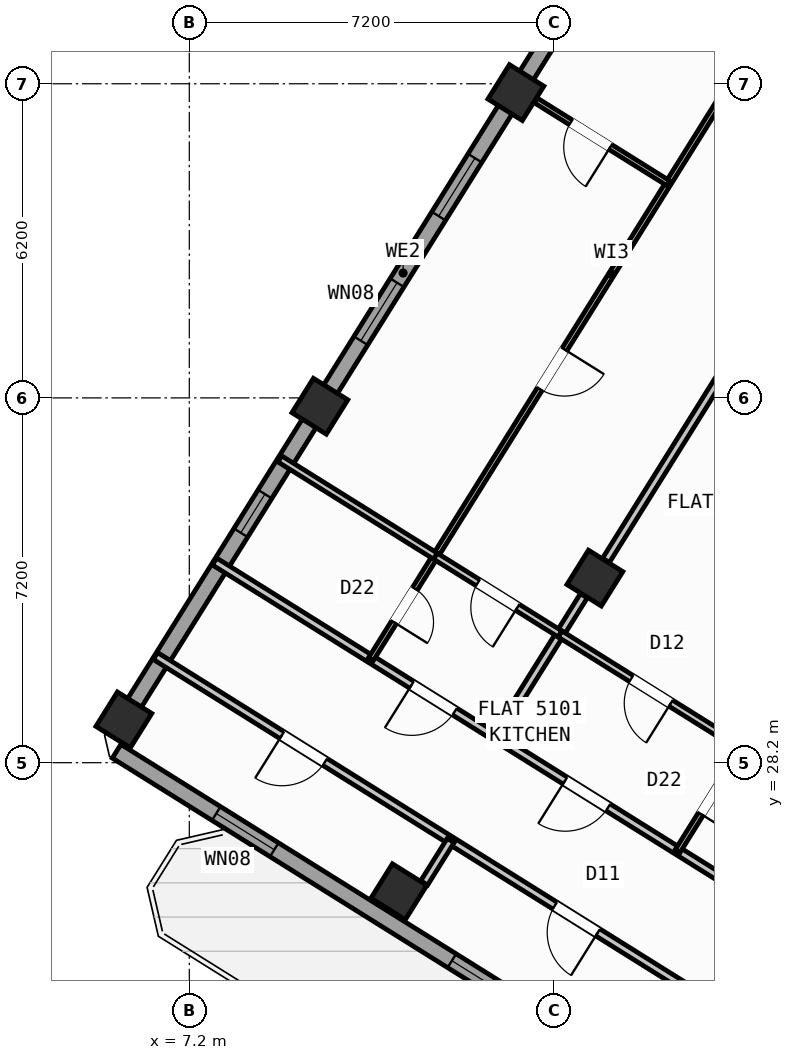
"""IFC4 building model, lengths in metres.
Left out: names, types, materials, properties, quantities, classifications, styles, units other than length and angle.
Written with IfcOpenShell. Run it as: python <this file> out.ifc"""

import sys

from ifc_helpers import new_model, si_unit, direction, frame, frame_2d, origin, origin_2d, place, context, subcontext, project, spatial, rectangle, hollow_rectangle, extrude, source, transform, mapped, element, fill, save


model = new_model("IFC4")
c1 = context("Model", 3, precision=1e-05, world=origin(), true_north=direction((0.0, 1.0)))
c2 = subcontext(c1, "Body", "Model", "MODEL_VIEW")
j1 = project(units=[si_unit("LENGTHUNIT", "METRE"), si_unit("PLANEANGLEUNIT", "RADIAN")], contexts=[c1])
p1 = place(None, origin())
s1 = spatial("IfcSite", under=j1, at=p1, CompositionType="ELEMENT")
p2 = place(p1, origin())
s2 = spatial("IfcBuilding", under=s1, at=p2, CompositionType="ELEMENT")
p3 = place(p2, frame((0.0, 0.0, 204.0)))
s3 = spatial("IfcBuildingStorey", under=s2, at=p3, CompositionType="ELEMENT", Elevation=204.0)
m1 = source(origin(), c2, "Body", "SweptSolid", [
    extrude(hollow_rectangle(XDim=0.8, YDim=0.8, WallThickness=0.032, at=origin_2d()), origin(), (0.0, 0.0, 1.0), 3.6),
])
for number, where, z_axis, x_axis in (
    (1, (15.205, 31.844, 0.0), (0.0, 0.0, 1.0), (-0.848, 0.53, 0.0)),
    (2, (11.336, 25.653, 0.0), (0.0, 0.0, 1.0), (-0.848, 0.53, 0.0)),
    (3, (13.646, 41.426, 0.0), (0.0, 0.0, 1.0), (-0.848, 0.53, 0.0)),
    (4, (9.777, 35.235, 0.0), (0.0, 0.0, 1.0), (-0.848, 0.53, 0.0)),
    (5, (5.909, 29.044, 0.0), (0.0, 0.0, 1.0), (-0.848, 0.53, 0.0)),
):
    element("IfcColumn", number, at=place(p3, frame(where, z_axis=z_axis, x_axis=x_axis)), inside=s3, PredefinedType="COLUMN", context=c2, shape_type="MappedRepresentation", body=[
        mapped(m1, transform((0.0, 0.0, 0.0), scale=1.0)),
    ])
p4 = place(p3, frame((31.76, 12.183, 0.0), z_axis=(0.0, 0.0, 1.0), x_axis=(-0.848047074256, 0.529920899612, 0.0)))
e6 = element("IfcWall", 6, at=p4, inside=s3, PredefinedType="STANDARD", context=c2, shape_type="SweptSolid", body=[
    extrude(rectangle(XDim=30.652, YDim=0.32, at=frame_2d((15.326, 0.0))), origin(), (0.0, 0.0, 1.0), 3.35),
])
p5 = place(p4, frame((15.166, 0.0, 0.0)))
e7 = element("IfcOpeningElement", 7, at=p5, cuts=e6, PredefinedType="OPENING", context=c2, shape_type="SweptSolid", body=[
    extrude(rectangle(XDim=1.2, YDim=2.15, at=frame_2d((0.6, 1.075))), frame((0.0, 0.17, 0.0), z_axis=(0.0, -1.0, 0.0), x_axis=(1.0, 0.0, 0.0)), (0.0, 0.0, 1.0), 0.34),
])
p6 = place(p4, frame((2.24, 0.0, 0.9)))
e8 = element("IfcOpeningElement", 8, at=p6, cuts=e6, PredefinedType="OPENING", context=c2, shape_type="SweptSolid", body=[
    extrude(rectangle(XDim=1.65, YDim=1.45, at=frame_2d((0.825, 0.725))), frame((0.0, 0.17, 0.0), z_axis=(0.0, -1.0, 0.0), x_axis=(1.0, 0.0, 0.0)), (0.0, 0.0, 1.0), 0.34),
])
p7 = place(p4, frame((7.469, 0.0, 0.9)))
e9 = element("IfcOpeningElement", 9, at=p7, cuts=e6, PredefinedType="OPENING", context=c2, shape_type="SweptSolid", body=[
    extrude(rectangle(XDim=1.65, YDim=1.45, at=frame_2d((0.825, 0.725))), frame((0.0, 0.17, 0.0), z_axis=(0.0, -1.0, 0.0), x_axis=(1.0, 0.0, 0.0)), (0.0, 0.0, 1.0), 0.34),
])
p8 = place(p4, frame((12.623, 0.0, 1.0)))
e10 = element("IfcOpeningElement", 10, at=p8, cuts=e6, PredefinedType="OPENING", context=c2, shape_type="SweptSolid", body=[
    extrude(rectangle(XDim=0.9, YDim=1.25, at=frame_2d((0.45, 0.625))), frame((0.0, 0.17, 0.0), z_axis=(0.0, -1.0, 0.0), x_axis=(1.0, 0.0, 0.0)), (0.0, 0.0, 1.0), 0.34),
])
p9 = place(p4, frame((19.556, 0.0, 1.0)))
e11 = element("IfcOpeningElement", 11, at=p9, cuts=e6, PredefinedType="OPENING", context=c2, shape_type="SweptSolid", body=[
    extrude(rectangle(XDim=0.9, YDim=1.25, at=frame_2d((0.45, 0.625))), frame((0.0, 0.17, 0.0), z_axis=(0.0, -1.0, 0.0), x_axis=(1.0, 0.0, 0.0)), (0.0, 0.0, 1.0), 0.34),
])
p10 = place(p4, frame((21.95, 0.0, 1.0)))
e12 = element("IfcOpeningElement", 12, at=p10, cuts=e6, PredefinedType="OPENING", context=c2, shape_type="SweptSolid", body=[
    extrude(rectangle(XDim=0.9, YDim=1.25, at=frame_2d((0.45, 0.625))), frame((0.0, 0.17, 0.0), z_axis=(0.0, -1.0, 0.0), x_axis=(1.0, 0.0, 0.0)), (0.0, 0.0, 1.0), 0.34),
])
p11 = place(p4, frame((26.983, 0.0, 0.9)))
e13 = element("IfcOpeningElement", 13, at=p11, cuts=e6, PredefinedType="OPENING", context=c2, shape_type="SweptSolid", body=[
    extrude(rectangle(XDim=1.35, YDim=1.45, at=frame_2d((0.675, 0.725))), frame((0.0, 0.17, 0.0), z_axis=(0.0, -1.0, 0.0), x_axis=(1.0, 0.0, 0.0)), (0.0, 0.0, 1.0), 0.34),
])
p12 = place(p3, frame((5.7, 28.71, 0.0), z_axis=(0.0, 0.0, 1.0), x_axis=(0.529923711467, 0.8480453172, 0.0)))
e14 = element("IfcWall", 14, at=p12, inside=s3, PredefinedType="STANDARD", context=c2, shape_type="SweptSolid", body=[
    extrude(rectangle(XDim=21.587, YDim=0.32, at=frame_2d((10.794, 0.0))), origin(), (0.0, 0.0, 1.0), 2.825),
])
p13 = place(p12, frame((4.749, 0.0, 1.0)))
e15 = element("IfcOpeningElement", 15, at=p13, cuts=e14, PredefinedType="OPENING", context=c2, shape_type="SweptSolid", body=[
    extrude(rectangle(XDim=0.9, YDim=1.25, at=frame_2d((0.45, 0.625))), frame((0.0, 0.17, 0.0), z_axis=(0.0, -1.0, 0.0), x_axis=(1.0, 0.0, 0.0)), (0.0, 0.0, 1.0), 0.34),
])
p14 = place(p12, frame((9.219, 0.0, 0.9)))
e16 = element("IfcOpeningElement", 16, at=p14, cuts=e14, PredefinedType="OPENING", context=c2, shape_type="SweptSolid", body=[
    extrude(rectangle(XDim=1.35, YDim=1.45, at=frame_2d((0.675, 0.725))), frame((0.0, 0.17, 0.0), z_axis=(0.0, -1.0, 0.0), x_axis=(1.0, 0.0, 0.0)), (0.0, 0.0, 1.0), 0.34),
])
p15 = place(p12, frame((12.119, 0.0, 0.9)))
e17 = element("IfcOpeningElement", 17, at=p15, cuts=e14, PredefinedType="OPENING", context=c2, shape_type="SweptSolid", body=[
    extrude(rectangle(XDim=1.35, YDim=1.45, at=frame_2d((0.675, 0.725))), frame((0.0, 0.17, 0.0), z_axis=(0.0, -1.0, 0.0), x_axis=(1.0, 0.0, 0.0)), (0.0, 0.0, 1.0), 0.34),
])
p16 = place(p12, frame((16.5, 0.0, 1.0)))
e18 = element("IfcOpeningElement", 18, at=p16, cuts=e14, PredefinedType="OPENING", context=c2, shape_type="SweptSolid", body=[
    extrude(rectangle(XDim=0.9, YDim=1.25, at=frame_2d((0.45, 0.625))), frame((0.0, 0.17, 0.0), z_axis=(0.0, -1.0, 0.0), x_axis=(1.0, 0.0, 0.0)), (0.0, 0.0, 1.0), 0.34),
])
p17 = place(p12, frame((18.913, 0.0, 1.0)))
e19 = element("IfcOpeningElement", 19, at=p17, cuts=e14, PredefinedType="OPENING", context=c2, shape_type="SweptSolid", body=[
    extrude(rectangle(XDim=0.9, YDim=1.25, at=frame_2d((0.45, 0.625))), frame((0.0, 0.17, 0.0), z_axis=(0.0, -1.0, 0.0), x_axis=(1.0, 0.0, 0.0)), (0.0, 0.0, 1.0), 0.34),
])
p18 = place(p3, frame((17.424, 47.083, 0.0), z_axis=(0.0, 0.0, 1.0), x_axis=(0.848049927979, -0.529916332693, 0.0)))
e20 = element("IfcWall", 20, at=p18, inside=s3, PredefinedType="STANDARD", context=c2, shape_type="SweptSolid", body=[
    extrude(rectangle(XDim=29.223, YDim=0.32, at=frame_2d((14.612, 0.0))), origin(), (0.0, 0.0, 1.0), 3.35),
])
p19 = place(p18, frame((8.799, 0.0, 0.0)))
e21 = element("IfcOpeningElement", 21, at=p19, cuts=e20, PredefinedType="OPENING", context=c2, shape_type="SweptSolid", body=[
    extrude(rectangle(XDim=1.05, YDim=2.15, at=frame_2d((0.525, 1.075))), frame((0.0, 0.17, 0.0), z_axis=(0.0, -1.0, 0.0), x_axis=(1.0, 0.0, 0.0)), (0.0, 0.0, 1.0), 0.34),
])
p20 = place(p18, frame((0.794, 0.0, 0.9)))
e22 = element("IfcOpeningElement", 22, at=p20, cuts=e20, PredefinedType="OPENING", context=c2, shape_type="SweptSolid", body=[
    extrude(rectangle(XDim=1.65, YDim=1.45, at=frame_2d((0.825, 0.725))), frame((0.0, 0.17, 0.0), z_axis=(0.0, -1.0, 0.0), x_axis=(1.0, 0.0, 0.0)), (0.0, 0.0, 1.0), 0.34),
])
p21 = place(p18, frame((4.056, 0.0, 0.9)))
e23 = element("IfcOpeningElement", 23, at=p21, cuts=e20, PredefinedType="OPENING", context=c2, shape_type="SweptSolid", body=[
    extrude(rectangle(XDim=1.35, YDim=1.45, at=frame_2d((0.675, 0.725))), frame((0.0, 0.17, 0.0), z_axis=(0.0, -1.0, 0.0), x_axis=(1.0, 0.0, 0.0)), (0.0, 0.0, 1.0), 0.34),
])
p22 = place(p18, frame((7.151, 0.0, 1.0)))
e24 = element("IfcOpeningElement", 24, at=p22, cuts=e20, PredefinedType="OPENING", context=c2, shape_type="SweptSolid", body=[
    extrude(rectangle(XDim=0.9, YDim=1.25, at=frame_2d((0.45, 0.625))), frame((0.0, 0.17, 0.0), z_axis=(0.0, -1.0, 0.0), x_axis=(1.0, 0.0, 0.0)), (0.0, 0.0, 1.0), 0.34),
])
p23 = place(p18, frame((14.612, 0.0, 1.0)))
e25 = element("IfcOpeningElement", 25, at=p23, cuts=e20, PredefinedType="OPENING", context=c2, shape_type="SweptSolid", body=[
    extrude(rectangle(XDim=0.9, YDim=1.25, at=frame_2d((0.45, 0.625))), frame((0.0, 0.17, 0.0), z_axis=(0.0, -1.0, 0.0), x_axis=(1.0, 0.0, 0.0)), (0.0, 0.0, 1.0), 0.34),
])
p24 = place(p18, frame((17.254, 0.0, 1.0)))
e26 = element("IfcOpeningElement", 26, at=p24, cuts=e20, PredefinedType="OPENING", context=c2, shape_type="SweptSolid", body=[
    extrude(rectangle(XDim=0.9, YDim=1.25, at=frame_2d((0.45, 0.625))), frame((0.0, 0.17, 0.0), z_axis=(0.0, -1.0, 0.0), x_axis=(1.0, 0.0, 0.0)), (0.0, 0.0, 1.0), 0.34),
])
p25 = place(p18, frame((21.139, 0.0, 0.9)))
e27 = element("IfcOpeningElement", 27, at=p25, cuts=e20, PredefinedType="OPENING", context=c2, shape_type="SweptSolid", body=[
    extrude(rectangle(XDim=1.35, YDim=1.45, at=frame_2d((0.675, 0.725))), frame((0.0, 0.17, 0.0), z_axis=(0.0, -1.0, 0.0), x_axis=(1.0, 0.0, 0.0)), (0.0, 0.0, 1.0), 0.34),
])
p26 = place(p18, frame((25.778, 0.0, 0.9)))
e28 = element("IfcOpeningElement", 28, at=p26, cuts=e20, PredefinedType="OPENING", context=c2, shape_type="SweptSolid", body=[
    extrude(rectangle(XDim=1.35, YDim=1.45, at=frame_2d((0.675, 0.725))), frame((0.0, 0.17, 0.0), z_axis=(0.0, -1.0, 0.0), x_axis=(1.0, 0.0, 0.0)), (0.0, 0.0, 1.0), 0.34),
])
p27 = place(p3, frame((21.885, 23.306, 0.0), z_axis=(0.0, 0.0, 1.0), x_axis=(-0.848052408131, 0.529912363569, 0.0)))
e29 = element("IfcWall", 29, at=p27, inside=s3, PredefinedType="PARTITIONING", context=c2, shape_type="SweptSolid", body=[
    extrude(rectangle(XDim=16.73, YDim=0.16, at=frame_2d((8.365, 0.0))), origin(), (0.0, 0.0, 1.0), 3.34),
])
p28 = place(p27, frame((7.57, 0.0, 0.0)))
e30 = element("IfcOpeningElement", 30, at=p28, cuts=e29, PredefinedType="OPENING", context=c2, shape_type="SweptSolid", body=[
    extrude(rectangle(XDim=1.0, YDim=2.1, at=frame_2d((0.5, 1.05))), frame((0.0, 0.09, 0.0), z_axis=(0.0, -1.0, 0.0), x_axis=(1.0, 0.0, 0.0)), (0.0, 0.0, 1.0), 0.18),
])
p29 = place(p27, frame((11.14, 0.0, 0.0)))
e31 = element("IfcOpeningElement", 31, at=p29, cuts=e29, PredefinedType="OPENING", context=c2, shape_type="SweptSolid", body=[
    extrude(rectangle(XDim=1.0, YDim=2.1, at=frame_2d((0.5, 1.05))), frame((0.0, 0.09, 0.0), z_axis=(0.0, -1.0, 0.0), x_axis=(1.0, 0.0, 0.0)), (0.0, 0.0, 1.0), 0.18),
])
p30 = place(p3, frame((20.719, 21.44, 0.0), z_axis=(0.0, 0.0, 1.0), x_axis=(-0.848048310262, 0.529918921593, 0.0)))
e32 = element("IfcWall", 32, at=p30, inside=s3, PredefinedType="PARTITIONING", context=c2, shape_type="SweptSolid", body=[
    extrude(rectangle(XDim=16.73, YDim=0.16, at=frame_2d((8.365, 0.0))), origin(), (0.0, 0.0, 1.0), 3.34),
])
p31 = place(p30, frame((1.505, 0.0, 0.0)))
e33 = element("IfcOpeningElement", 33, at=p31, cuts=e32, PredefinedType="OPENING", context=c2, shape_type="SweptSolid", body=[
    extrude(rectangle(XDim=1.0, YDim=2.1, at=frame_2d((0.5, 1.05))), frame((0.0, 0.09, 0.0), z_axis=(0.0, -1.0, 0.0), x_axis=(1.0, 0.0, 0.0)), (0.0, 0.0, 1.0), 0.18),
])
p32 = place(p30, frame((6.435, 0.0, 0.0)))
e34 = element("IfcOpeningElement", 34, at=p32, cuts=e32, PredefinedType="OPENING", context=c2, shape_type="SweptSolid", body=[
    extrude(rectangle(XDim=1.0, YDim=2.1, at=frame_2d((0.5, 1.05))), frame((0.0, 0.09, 0.0), z_axis=(0.0, -1.0, 0.0), x_axis=(1.0, 0.0, 0.0)), (0.0, 0.0, 1.0), 0.18),
])
p33 = place(p30, frame((12.784, 0.0, 0.0)))
e35 = element("IfcOpeningElement", 35, at=p33, cuts=e32, PredefinedType="OPENING", context=c2, shape_type="SweptSolid", body=[
    extrude(rectangle(XDim=1.0, YDim=2.1, at=frame_2d((0.5, 1.05))), frame((0.0, 0.09, 0.0), z_axis=(0.0, -1.0, 0.0), x_axis=(1.0, 0.0, 0.0)), (0.0, 0.0, 1.0), 0.18),
])
p34 = place(p3, frame((12.359, 26.665, 0.0), z_axis=(0.0, 0.0, 1.0), x_axis=(-0.529821225456, -0.848109349704, 0.0)))
e36 = element("IfcWall", 36, at=p34, inside=s3, PredefinedType="PARTITIONING", context=c2, shape_type="SweptSolid", body=[
    extrude(rectangle(XDim=0.988, YDim=0.16, at=frame_2d((0.494, 0.0))), origin(), (0.0, 0.0, 1.0), 3.34),
])
p35 = place(p3, frame((18.854, 37.685, 0.0), z_axis=(0.0, 0.0, 1.0), x_axis=(-0.529907440938, -0.848055484057, 0.0)))
e37 = element("IfcWall", 37, at=p35, inside=s3, PredefinedType="PARTITIONING", context=c2, shape_type="SweptSolid", body=[
    extrude(rectangle(XDim=6.476, YDim=0.16, at=frame_2d((3.238, 0.0))), origin(), (0.0, 0.0, 1.0), 2.825),
])
p36 = place(p3, frame((14.986, 31.494, 0.0), z_axis=(0.0, 0.0, 1.0), x_axis=(-0.529885466561, -0.848069214349, 0.0)))
e38 = element("IfcWall", 38, at=p36, inside=s3, PredefinedType="PARTITIONING", context=c2, shape_type="SweptSolid", body=[
    extrude(rectangle(XDim=3.288, YDim=0.16, at=frame_2d((1.644, 0.0))), origin(), (0.0, 0.0, 1.0), 2.825),
])
p37 = place(p3, frame((26.336, 41.656, 0.0), z_axis=(0.0, 0.0, 1.0), x_axis=(-0.529916887708, -0.848049581169, 0.0)))
e39 = element("IfcWall", 39, at=p37, inside=s3, PredefinedType="PARTITIONING", context=c2, shape_type="SweptSolid", body=[
    extrude(rectangle(XDim=17.92, YDim=0.11, at=frame_2d((8.96, 0.0))), origin(), (0.0, 0.0, 1.0), 2.995),
])
p38 = place(p37, frame((16.28, 0.0, 0.0)))
e40 = element("IfcOpeningElement", 40, at=p38, cuts=e39, PredefinedType="OPENING", context=c2, shape_type="SweptSolid", body=[
    extrude(rectangle(XDim=0.78, YDim=2.05, at=frame_2d((0.39, 1.025))), frame((0.0, 0.065, 0.0), z_axis=(0.0, -1.0, 0.0), x_axis=(1.0, 0.0, 0.0)), (0.0, 0.0, 1.0), 0.13),
])
p39 = place(p37, frame((7.3, 0.0, 0.0)))
e41 = element("IfcOpeningElement", 41, at=p39, cuts=e39, PredefinedType="OPENING", context=c2, shape_type="SweptSolid", body=[
    extrude(rectangle(XDim=0.92, YDim=2.08, at=frame_2d((0.46, 1.04))), frame((0.0, 0.065, 0.0), z_axis=(0.0, -1.0, 0.0), x_axis=(1.0, 0.0, 0.0)), (0.0, 0.0, 1.0), 0.13),
])
p40 = place(p3, frame((18.111, 28.494, 0.0), z_axis=(0.0, 0.0, 1.0), x_axis=(-0.848024181217, 0.529957534215, 0.0)))
e42 = element("IfcWall", 42, at=p40, inside=s3, PredefinedType="PLUMBINGWALL", context=c2, shape_type="SweptSolid", body=[
    extrude(rectangle(XDim=4.24, YDim=0.14, at=frame_2d((2.12, 0.0))), origin(), (0.0, 0.0, 1.0), 3.34),
])
p41 = place(p40, frame((1.66, 0.0, 0.0)))
e43 = element("IfcOpeningElement", 43, at=p41, cuts=e42, PredefinedType="OPENING", context=c2, shape_type="SweptSolid", body=[
    extrude(rectangle(XDim=0.92, YDim=2.08, at=frame_2d((0.46, 1.04))), frame((0.0, 0.08, 0.0), z_axis=(0.0, -1.0, 0.0), x_axis=(1.0, 0.0, 0.0)), (0.0, 0.0, 1.0), 0.16),
])
p42 = place(p3, frame((20.281, 45.44, 0.0), z_axis=(0.0, 0.0, 1.0), x_axis=(-0.529916887708, -0.848049581169, 0.0)))
e44 = element("IfcWall", 44, at=p42, inside=s3, PredefinedType="PARTITIONING", context=c2, shape_type="SweptSolid", body=[
    extrude(rectangle(XDim=17.92, YDim=0.11, at=frame_2d((8.96, 0.0))), origin(), (0.0, 0.0, 1.0), 3.34),
])
p43 = place(p42, frame((16.28, 0.0, 0.0)))
e45 = element("IfcOpeningElement", 45, at=p43, cuts=e44, PredefinedType="OPENING", context=c2, shape_type="SweptSolid", body=[
    extrude(rectangle(XDim=0.78, YDim=2.05, at=frame_2d((0.39, 1.025))), frame((0.0, 0.065, 0.0), z_axis=(0.0, -1.0, 0.0), x_axis=(1.0, 0.0, 0.0)), (0.0, 0.0, 1.0), 0.13),
])
p44 = place(p42, frame((10.711, 0.0, 0.0)))
e46 = element("IfcOpeningElement", 46, at=p44, cuts=e44, PredefinedType="OPENING", context=c2, shape_type="SweptSolid", body=[
    extrude(rectangle(XDim=0.92, YDim=2.08, at=frame_2d((0.46, 1.04))), frame((0.0, 0.065, 0.0), z_axis=(0.0, -1.0, 0.0), x_axis=(1.0, 0.0, 0.0)), (0.0, 0.0, 1.0), 0.13),
])
p45 = place(p3, frame((14.516, 30.741, 0.0), z_axis=(0.0, 0.0, 1.0), x_axis=(-0.848059786386, 0.529900555496, 0.0)))
e47 = element("IfcWall", 47, at=p45, inside=s3, PredefinedType="PLUMBINGWALL", context=c2, shape_type="SweptSolid", body=[
    extrude(rectangle(XDim=2.9, YDim=0.14, at=frame_2d((1.45, 0.0))), origin(), (0.0, 0.0, 1.0), 3.34),
])
p46 = place(p45, frame((0.99, 0.0, 0.0)))
e48 = element("IfcOpeningElement", 48, at=p46, cuts=e47, PredefinedType="OPENING", context=c2, shape_type="SweptSolid", body=[
    extrude(rectangle(XDim=0.92, YDim=2.08, at=frame_2d((0.46, 1.04))), frame((0.0, 0.08, 0.0), z_axis=(0.0, -1.0, 0.0), x_axis=(1.0, 0.0, 0.0)), (0.0, 0.0, 1.0), 0.16),
])
p47 = place(p3, frame((12.056, 32.278, 0.0), z_axis=(0.0, 0.0, 1.0), x_axis=(-0.848039976902, 0.529932257535, 0.0)))
e49 = element("IfcWall", 49, at=p47, inside=s3, PredefinedType="PLUMBINGWALL", context=c2, shape_type="SweptSolid", body=[
    extrude(rectangle(XDim=3.62, YDim=0.14, at=frame_2d((1.81, 0.0))), origin(), (0.0, 0.0, 1.0), 3.34),
])
p48 = place(p3, frame((16.654, 39.636, 0.0), z_axis=(0.0, 0.0, 1.0), x_axis=(-0.848060484804, 0.529899437736, 0.0)))
e50 = element("IfcWall", 50, at=p48, inside=s3, PredefinedType="PARTITIONING", context=c2, shape_type="SweptSolid", body=[
    extrude(rectangle(XDim=3.088, YDim=0.11, at=frame_2d((1.544, 0.0))), origin(), (0.0, 0.0, 1.0), 2.825),
])
p49 = place(p48, frame((1.35, 0.0, 0.0)))
e51 = element("IfcOpeningElement", 51, at=p49, cuts=e50, PredefinedType="OPENING", context=c2, shape_type="SweptSolid", body=[
    extrude(rectangle(XDim=0.92, YDim=2.08, at=frame_2d((0.46, 1.04))), frame((0.0, 0.065, 0.0), z_axis=(0.0, -1.0, 0.0), x_axis=(1.0, 0.0, 0.0)), (0.0, 0.0, 1.0), 0.13),
])
m2 = source(origin(), c2, "Body", "SweptSolid", [
    extrude(rectangle(XDim=0.9, YDim=1.25, at=frame_2d((0.45, 0.625))), frame((0.0, 0.03, 0.0), z_axis=(0.0, -1.0, 0.0), x_axis=(1.0, 0.0, 0.0)), (0.0, 0.0, 1.0), 0.06),
])
p50 = place(p10, origin())
e52 = element("IfcWindow", 52, at=p50, inside=s3, PartitioningType="SINGLE_PANEL", PredefinedType="WINDOW", context=c2, shape_type="MappedRepresentation", body=[
    mapped(m2, transform((0.0, 0.0, 0.0), scale=1.0)),
])
fill(e12, e52)
m3 = source(origin(), c2, "Body", "SweptSolid", [
    extrude(rectangle(XDim=1.35, YDim=1.45, at=frame_2d((0.675, 0.725))), frame((0.0, 0.03, 0.0), z_axis=(0.0, -1.0, 0.0), x_axis=(1.0, 0.0, 0.0)), (0.0, 0.0, 1.0), 0.06),
])
p51 = place(p11, origin())
e53 = element("IfcWindow", 53, at=p51, inside=s3, PartitioningType="SINGLE_PANEL", PredefinedType="WINDOW", context=c2, shape_type="MappedRepresentation", body=[
    mapped(m3, transform((0.0, 0.0, 0.0), scale=1.0)),
])
fill(e13, e53)
p52 = place(p13, origin())
e54 = element("IfcWindow", 54, at=p52, inside=s3, PartitioningType="SINGLE_PANEL", PredefinedType="WINDOW", context=c2, shape_type="MappedRepresentation", body=[
    mapped(m2, transform((0.0, 0.0, 0.0), scale=1.0)),
])
fill(e15, e54)
p53 = place(p14, origin())
e55 = element("IfcWindow", 55, at=p53, inside=s3, PartitioningType="SINGLE_PANEL", PredefinedType="WINDOW", context=c2, shape_type="MappedRepresentation", body=[
    mapped(m3, transform((0.0, 0.0, 0.0), scale=1.0)),
])
fill(e16, e55)
p54 = place(p15, origin())
e56 = element("IfcWindow", 56, at=p54, inside=s3, PartitioningType="SINGLE_PANEL", PredefinedType="WINDOW", context=c2, shape_type="MappedRepresentation", body=[
    mapped(m3, transform((0.0, 0.0, 0.0), scale=1.0)),
])
fill(e17, e56)
m4 = source(origin(), c2, "Body", "SweptSolid", [
    extrude(rectangle(XDim=1.0, YDim=2.1, at=frame_2d((0.5, 1.05))), frame((0.0, 0.025, 0.0), z_axis=(0.0, -1.0, 0.0), x_axis=(1.0, 0.0, 0.0)), (0.0, 0.0, 1.0), 0.05),
])
p55 = place(p32, origin())
e57 = element("IfcDoor", 57, at=p55, inside=s3, OperationType="SINGLE_SWING_LEFT", PredefinedType="DOOR", context=c2, shape_type="MappedRepresentation", body=[
    mapped(m4, transform((0.0, 0.0, 0.0), scale=1.0)),
])
fill(e34, e57)
p56 = place(p33, origin())
e58 = element("IfcDoor", 58, at=p56, inside=s3, OperationType="SINGLE_SWING_RIGHT", PredefinedType="DOOR", context=c2, shape_type="MappedRepresentation", body=[
    mapped(m4, transform((0.0, 0.0, 0.0), scale=1.0)),
])
fill(e35, e58)
p57 = place(p28, origin())
e59 = element("IfcDoor", 59, at=p57, inside=s3, OperationType="SINGLE_SWING_RIGHT", PredefinedType="DOOR", context=c2, shape_type="MappedRepresentation", body=[
    mapped(m4, transform((0.0, 0.0, 0.0), scale=1.0)),
])
fill(e30, e59)
m5 = source(origin(), c2, "Body", "SweptSolid", [
    extrude(rectangle(XDim=0.92, YDim=2.08, at=frame_2d((0.46, 1.04))), frame((0.0, 0.025, 0.0), z_axis=(0.0, -1.0, 0.0), x_axis=(1.0, 0.0, 0.0)), (0.0, 0.0, 1.0), 0.05),
])
p58 = place(p41, origin())
e60 = element("IfcDoor", 60, at=p58, inside=s3, OperationType="SINGLE_SWING_LEFT", PredefinedType="DOOR", context=c2, shape_type="MappedRepresentation", body=[
    mapped(m5, transform((0.0, 0.0, 0.0), scale=1.0)),
])
fill(e43, e60)
m6 = source(origin(), c2, "Body", "SweptSolid", [
    extrude(rectangle(XDim=0.78, YDim=2.05, at=frame_2d((0.39, 1.025))), frame((0.0, 0.025, 0.0), z_axis=(0.0, -1.0, 0.0), x_axis=(1.0, 0.0, 0.0)), (0.0, 0.0, 1.0), 0.05),
])
p59 = place(p38, origin())
e61 = element("IfcDoor", 61, at=p59, inside=s3, OperationType="SINGLE_SWING_RIGHT", PredefinedType="DOOR", context=c2, shape_type="MappedRepresentation", body=[
    mapped(m6, transform((0.0, 0.0, 0.0), scale=1.0)),
])
fill(e40, e61)
p60 = place(p29, origin())
e62 = element("IfcDoor", 62, at=p60, inside=s3, OperationType="SINGLE_SWING_RIGHT", PredefinedType="DOOR", context=c2, shape_type="MappedRepresentation", body=[
    mapped(m4, transform((0.0, 0.0, 0.0), scale=1.0)),
])
fill(e31, e62)
p61 = place(p46, origin())
e63 = element("IfcDoor", 63, at=p61, inside=s3, OperationType="SINGLE_SWING_LEFT", PredefinedType="DOOR", context=c2, shape_type="MappedRepresentation", body=[
    mapped(m5, transform((0.0, 0.0, 0.0), scale=1.0)),
])
fill(e48, e63)
p62 = place(p43, origin())
e64 = element("IfcDoor", 64, at=p62, inside=s3, OperationType="SINGLE_SWING_RIGHT", PredefinedType="DOOR", context=c2, shape_type="MappedRepresentation", body=[
    mapped(m6, transform((0.0, 0.0, 0.0), scale=1.0)),
])
fill(e45, e64)
p63 = place(p44, origin())
e65 = element("IfcDoor", 65, at=p63, inside=s3, OperationType="SINGLE_SWING_LEFT", PredefinedType="DOOR", context=c2, shape_type="MappedRepresentation", body=[
    mapped(m5, transform((0.0, 0.0, 0.0), scale=1.0)),
])
fill(e46, e65)
p64 = place(p49, origin())
e66 = element("IfcDoor", 66, at=p64, inside=s3, OperationType="SINGLE_SWING_LEFT", PredefinedType="DOOR", context=c2, shape_type="MappedRepresentation", body=[
    mapped(m5, transform((0.0, 0.0, 0.0), scale=1.0)),
])
fill(e51, e66)
save(model, sys.argv[1])
